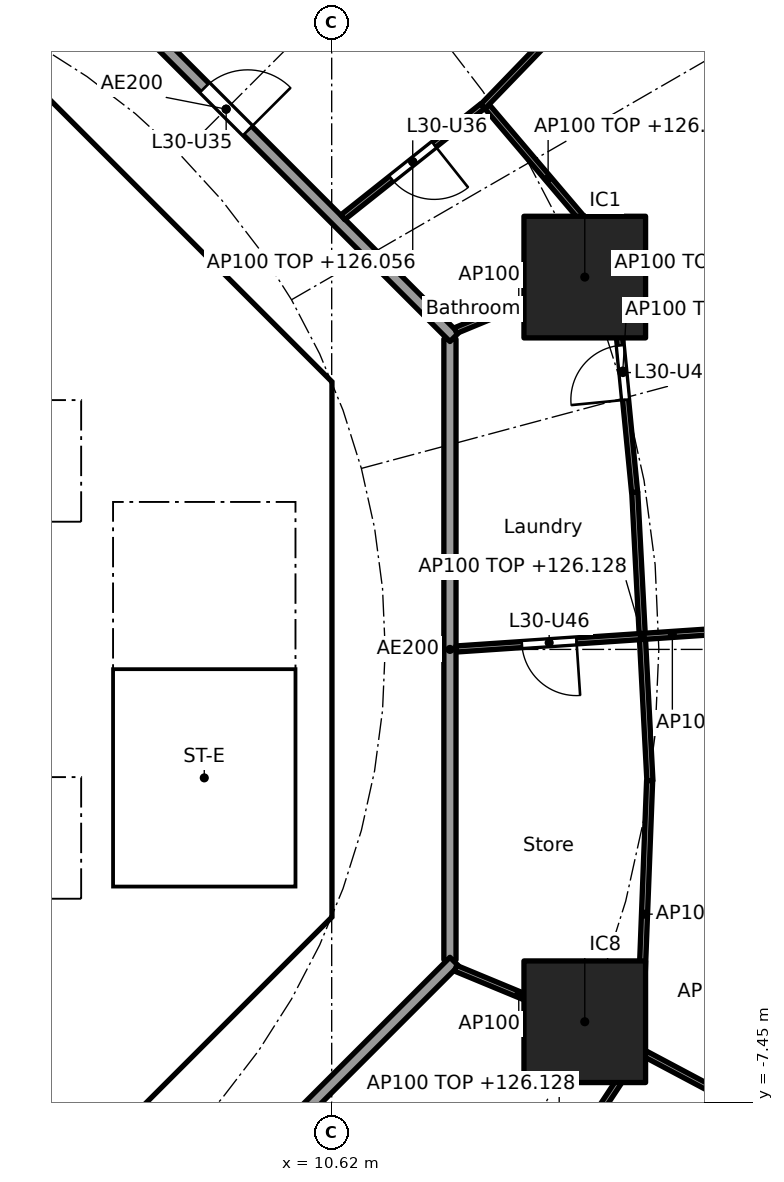
"""IFC4 building model, lengths in metres.
Left out: names, types, materials, properties, quantities, classifications, styles, units other than length and angle.
Written with IfcOpenShell. Run it as: python <this file> out.ifc"""

import sys

from ifc_helpers import new_model, si_unit, direction, frame, frame_2d, origin, origin_2d, place, context, subcontext, project, spatial, polyline, rectangle, outline, extrude, element, fill, save


model = new_model("IFC4")
c1 = context("Model", 3, precision=1e-05, world=origin(), true_north=direction((0.0, 1.0)))
c2 = subcontext(c1, "Body", "Model", "MODEL_VIEW")
j1 = project(units=[si_unit("LENGTHUNIT", "METRE"), si_unit("PLANEANGLEUNIT", "RADIAN")], contexts=[c1])
p1 = place(None, origin())
s1 = spatial("IfcSite", under=j1, at=p1, CompositionType="ELEMENT")
p2 = place(p1, origin())
s2 = spatial("IfcBuilding", under=s1, at=p2, CompositionType="ELEMENT")
p3 = place(p2, frame((0.0, 0.0, 123.3)))
s3 = spatial("IfcBuildingStorey", under=s2, at=p3, CompositionType="ELEMENT", Elevation=123.3)
for number, where, z_axis, x_axis in (
    (1, (14.782, 6.123, 0.0), (0.0, 0.0, 1.0), (1.0, 0.0, 0.0)),
    (2, (14.782, -6.123, 0.0), (0.0, 0.0, 1.0), (1.0, 0.0, 0.0)),
):
    element("IfcColumn", number, at=place(p3, frame(where, z_axis=z_axis, x_axis=x_axis)), inside=s3, PredefinedType="COLUMN", context=c2, shape_type="SweptSolid", body=[
        extrude(rectangle(XDim=2.0, YDim=2.0, at=origin_2d()), origin(), (0.0, 0.0, 1.0), 3.7),
    ])
p4 = place(p3, frame((9.988, 4.613, 0.0), z_axis=(0.0, 0.0, 1.0), x_axis=(-0.707106781187, 0.707106781187, 0.0)))
e3 = element("IfcWall", 3, at=p4, inside=s3, PredefinedType="SHEAR", context=c2, shape_type="SweptSolid", body=[
    extrude(rectangle(XDim=7.602, YDim=0.6, at=frame_2d((3.801, 0.0))), origin(), (0.0, 0.0, 1.0), 3.44),
])
p5 = place(p4, frame((3.201, 0.0, 0.0)))
e4 = element("IfcOpeningElement", 4, at=p5, cuts=e3, PredefinedType="OPENING", context=c2, shape_type="SweptSolid", body=[
    extrude(rectangle(XDim=1.2, YDim=2.1, at=frame_2d((0.6, 1.05))), frame((0.0, 0.31, 0.0), z_axis=(0.0, -1.0, 0.0), x_axis=(1.0, 0.0, 0.0)), (0.0, 0.0, 1.0), 0.62),
])
p6 = place(p3, frame((4.613, -9.988, 0.0), z_axis=(0.0, 0.0, 1.0), x_axis=(0.707106781187, 0.707106781187, 0.0)))
e5 = element("IfcWall", 5, at=p6, inside=s3, PredefinedType="SHEAR", context=c2, shape_type="SweptSolid", body=[
    extrude(rectangle(XDim=7.602, YDim=0.6, at=frame_2d((3.801, 0.0))), origin(), (0.0, 0.0, 1.0), 3.44),
])
p7 = place(p6, frame((3.201, 0.0, 0.0)))
e6 = element("IfcOpeningElement", 6, at=p7, cuts=e5, PredefinedType="OPENING", context=c2, shape_type="SweptSolid", body=[
    extrude(rectangle(XDim=1.2, YDim=2.1, at=frame_2d((0.6, 1.05))), frame((0.0, 0.31, 0.0), z_axis=(0.0, -1.0, 0.0), x_axis=(1.0, 0.0, 0.0)), (0.0, 0.0, 1.0), 0.62),
])
p8 = place(p3, frame((-6.7, 2.0, 0.0), z_axis=(0.0, 0.0, 1.0), x_axis=(1.0, 0.0, 0.0)))
e7 = element("IfcWall", 7, at=p8, inside=s3, PredefinedType="SOLIDWALL", context=c2, shape_type="SweptSolid", body=[
    extrude(rectangle(XDim=13.4, YDim=0.2, at=frame_2d((6.7, 0.0))), origin(), (0.0, 0.0, 1.0), 3.44),
])
p9 = place(p8, frame((0.65, 0.0, 0.0)))
e8 = element("IfcOpeningElement", 8, at=p9, cuts=e7, PredefinedType="OPENING", context=c2, shape_type="SweptSolid", body=[
    extrude(rectangle(XDim=1.1, YDim=2.1, at=frame_2d((0.55, 1.05))), frame((0.0, 0.11, 0.0), z_axis=(0.0, -1.0, 0.0), x_axis=(1.0, 0.0, 0.0)), (0.0, 0.0, 1.0), 0.22),
])
p10 = place(p8, frame((2.85, 0.0, 0.0)))
e9 = element("IfcOpeningElement", 9, at=p10, cuts=e7, PredefinedType="OPENING", context=c2, shape_type="SweptSolid", body=[
    extrude(rectangle(XDim=1.1, YDim=2.1, at=frame_2d((0.55, 1.05))), frame((0.0, 0.11, 0.0), z_axis=(0.0, -1.0, 0.0), x_axis=(1.0, 0.0, 0.0)), (0.0, 0.0, 1.0), 0.22),
])
p11 = place(p8, frame((5.05, 0.0, 0.0)))
e10 = element("IfcOpeningElement", 10, at=p11, cuts=e7, PredefinedType="OPENING", context=c2, shape_type="SweptSolid", body=[
    extrude(rectangle(XDim=1.1, YDim=2.1, at=frame_2d((0.55, 1.05))), frame((0.0, 0.11, 0.0), z_axis=(0.0, -1.0, 0.0), x_axis=(1.0, 0.0, 0.0)), (0.0, 0.0, 1.0), 0.22),
])
p12 = place(p3, frame((6.7, 4.0, 0.0), z_axis=(0.0, 0.0, 1.0), x_axis=(1.0, 0.0, 0.0)))
e11 = element("IfcWall", 11, at=p12, inside=s3, PredefinedType="SOLIDWALL", context=c2, shape_type="SweptSolid", body=[
    extrude(rectangle(XDim=3.325, YDim=0.2, at=frame_2d((1.662, 0.0))), origin(), (0.0, 0.0, 1.0), 3.44),
])
p13 = place(p12, frame((1.25, 0.0, 0.0)))
e12 = element("IfcOpeningElement", 12, at=p13, cuts=e11, PredefinedType="OPENING", context=c2, shape_type="SweptSolid", body=[
    extrude(rectangle(XDim=1.1, YDim=2.1, at=frame_2d((0.55, 1.05))), frame((0.0, 0.11, 0.0), z_axis=(0.0, -1.0, 0.0), x_axis=(1.0, 0.0, 0.0)), (0.0, 0.0, 1.0), 0.22),
])
p14 = place(p3, frame((-6.7, -2.0, 0.0), z_axis=(0.0, 0.0, 1.0), x_axis=(1.0, 0.0, 0.0)))
e13 = element("IfcWall", 13, at=p14, inside=s3, PredefinedType="SOLIDWALL", context=c2, shape_type="SweptSolid", body=[
    extrude(rectangle(XDim=13.4, YDim=0.2, at=frame_2d((6.7, 0.0))), origin(), (0.0, 0.0, 1.0), 3.44),
])
p15 = place(p14, frame((0.65, 0.0, 0.0)))
e14 = element("IfcOpeningElement", 14, at=p15, cuts=e13, PredefinedType="OPENING", context=c2, shape_type="SweptSolid", body=[
    extrude(rectangle(XDim=1.1, YDim=2.1, at=frame_2d((0.55, 1.05))), frame((0.0, 0.11, 0.0), z_axis=(0.0, -1.0, 0.0), x_axis=(1.0, 0.0, 0.0)), (0.0, 0.0, 1.0), 0.22),
])
p16 = place(p14, frame((2.85, 0.0, 0.0)))
e15 = element("IfcOpeningElement", 15, at=p16, cuts=e13, PredefinedType="OPENING", context=c2, shape_type="SweptSolid", body=[
    extrude(rectangle(XDim=1.1, YDim=2.1, at=frame_2d((0.55, 1.05))), frame((0.0, 0.11, 0.0), z_axis=(0.0, -1.0, 0.0), x_axis=(1.0, 0.0, 0.0)), (0.0, 0.0, 1.0), 0.22),
])
p17 = place(p3, origin())
e16 = element("IfcWall", 16, at=p17, inside=s3, PredefinedType="SHEAR", context=c2, shape_type="SweptSolid", body=[
    extrude(outline(polyline([(9.776, -4.401), (10.025, -4.152), (10.025, -3.801), (10.025, 4.152), (9.776, 4.401), (10.2, 4.825), (10.625, 4.401), (10.625, -4.401), (10.2, -4.825), (9.776, -4.401)])), origin(), (0.0, 0.0, 1.0), 3.44),
])
p18 = place(p3, origin())
e17 = element("IfcWall", 17, at=p18, inside=s3, PredefinedType="SOLIDWALL", context=c2, shape_type="SweptSolid", body=[
    extrude(outline(polyline([(-6.7, -2.1), (-6.5, -2.1), (-6.5, -4.1), (-4.5, -4.1), (-4.5, -2.1), (-4.3, -2.1), (-4.3, -4.1), (-2.3, -4.1), (-2.3, -2.1), (-2.1, -2.1), (-2.1, -4.1), (-0.1, -4.1), (-0.1, -2.1), (0.1, -2.1), (0.1, -4.1), (2.1, -4.1), (2.1, -2.1), (2.3, -2.1), (2.3, -4.1), (4.3, -4.1), (4.3, -2.1), (4.5, -2.1), (4.5, -4.1), (6.5, -4.1), (6.5, -2.1), (6.7, -2.1), (6.7, -4.3), (-6.7, -4.3), (-6.7, -2.1)])), origin(), (0.0, 0.0, 1.0), 3.44),
])
p19 = place(p3, origin())
e18 = element("IfcWall", 18, at=p19, inside=s3, PredefinedType="SOLIDWALL", context=c2, shape_type="SweptSolid", body=[
    extrude(outline(polyline([(-6.5, 2.1), (-6.7, 2.1), (-6.7, 4.3), (6.7, 4.3), (6.7, 2.1), (6.5, 2.1), (6.5, 4.1), (4.5, 4.1), (4.5, 2.1), (4.3, 2.1), (4.3, 4.1), (2.3, 4.1), (2.3, 2.1), (2.1, 2.1), (2.1, 4.1), (0.1, 4.1), (0.1, 2.1), (-0.1, 2.1), (-0.1, 4.1), (-2.1, 4.1), (-2.1, 2.1), (-2.3, 2.1), (-2.3, 4.1), (-4.3, 4.1), (-4.3, 2.1), (-4.5, 2.1), (-4.5, 4.1), (-6.5, 4.1), (-6.5, 2.1)])), origin(), (0.0, 0.0, 1.0), 3.44),
])
p20 = place(p3, origin())
e19 = element("IfcWall", 19, at=p20, inside=s3, PredefinedType="SOLIDWALL", context=c2, shape_type="SweptSolid", body=[
    extrude(outline(polyline([(7.025, -3.9), (6.7, -3.9), (6.7, 3.9), (7.025, 3.9), (7.025, -3.9)])), origin(), (0.0, 0.0, 1.0), 3.44),
])
p21 = place(p3, origin())
e20 = element("IfcWall", 20, at=p21, inside=s3, PredefinedType="SOLIDWALL", context=c2, shape_type="SweptSolid", body=[
    extrude(outline(polyline([(10.025, -4.1), (6.7, -4.1), (6.7, -3.9), (10.025, -3.9), (10.025, -4.1)])), origin(), (0.0, 0.0, 1.0), 3.44),
])
p22 = place(p3, frame((12.565, -5.104, 0.0), z_axis=(0.0, 0.0, 1.0), x_axis=(0.0, 1.0, 0.0)))
e21 = element("IfcWall", 21, at=p22, inside=s3, PredefinedType="PARTITIONING", context=c2, shape_type="SweptSolid", body=[
    extrude(rectangle(XDim=10.209, YDim=0.2, at=frame_2d((5.104, 0.0))), origin(), (0.0, 0.0, 1.0), 3.44),
])
p23 = place(p3, frame((12.635, 5.134, 0.0), z_axis=(0.0, 0.0, 1.0), x_axis=(-0.707106781187, 0.707106781187, 0.0)))
e22 = element("IfcWall", 22, at=p23, inside=s3, PredefinedType="PARTITIONING", context=c2, shape_type="SweptSolid", body=[
    extrude(rectangle(XDim=10.609, YDim=0.2, at=frame_2d((5.305, 0.0))), origin(), (0.0, 0.0, 1.0), 3.44),
])
p24 = place(p23, frame((4.804, 0.0, 0.0)))
e23 = element("IfcOpeningElement", 23, at=p24, cuts=e22, PredefinedType="OPENING", context=c2, shape_type="SweptSolid", body=[
    extrude(rectangle(XDim=1.0, YDim=2.1, at=frame_2d((0.5, 1.05))), frame((0.0, 0.11, 0.0), z_axis=(0.0, -1.0, 0.0), x_axis=(1.0, 0.0, 0.0)), (0.0, 0.0, 1.0), 0.22),
])
p25 = place(p3, frame((5.275, -12.494, 0.0), z_axis=(0.0, 0.0, 1.0), x_axis=(0.707106781187, 0.707106781187, 0.0)))
e24 = element("IfcWall", 24, at=p25, inside=s3, PredefinedType="PARTITIONING", context=c2, shape_type="SweptSolid", body=[
    extrude(rectangle(XDim=10.409, YDim=0.2, at=frame_2d((5.205, 0.0))), origin(), (0.0, 0.0, 1.0), 3.44),
])
p26 = place(p3, frame((15.853, -2.158, 0.0), z_axis=(0.0, 0.0, 1.0), x_axis=(-0.052483289253, 0.99862180246, 0.0)))
e25 = element("IfcWall", 25, at=p26, inside=s3, PredefinedType="PARTITIONING", context=c2, shape_type="SweptSolid", body=[
    extrude(rectangle(XDim=4.75, YDim=0.1, at=frame_2d((2.375, 0.0))), origin(), (0.0, 0.0, 1.0), 2.828),
])
p27 = place(p3, frame((15.849, -2.158, 0.0), z_axis=(0.0, 0.0, 1.0), x_axis=(-0.038390448414, -0.999262815014, 0.0)))
e26 = element("IfcWall", 26, at=p27, inside=s3, PredefinedType="PARTITIONING", context=c2, shape_type="SweptSolid", body=[
    extrude(rectangle(XDim=4.394, YDim=0.1, at=frame_2d((2.197, 0.0))), origin(), (0.0, 0.0, 1.0), 3.44),
])
p28 = place(p3, frame((12.665, 0.007, 0.0), z_axis=(0.0, 0.0, 1.0), x_axis=(0.997737186236, 0.067234717233, 0.0)))
e27 = element("IfcWall", 27, at=p28, inside=s3, PredefinedType="PARTITIONING", context=c2, shape_type="SweptSolid", body=[
    extrude(rectangle(XDim=7.132, YDim=0.1, at=frame_2d((3.566, 0.0))), origin(), (0.0, 0.0, 1.0), 2.756),
])
p29 = place(p28, frame((4.651, 0.0, 0.0)))
e28 = element("IfcOpeningElement", 28, at=p29, cuts=e27, PredefinedType="OPENING", context=c2, shape_type="SweptSolid", body=[
    extrude(rectangle(XDim=0.9, YDim=2.1, at=frame_2d((0.45, 1.05))), frame((0.0, 0.06, 0.0), z_axis=(0.0, -1.0, 0.0), x_axis=(1.0, 0.0, 0.0)), (0.0, 0.0, 1.0), 0.12),
])
p30 = place(p28, frame((1.085, 0.0, 0.0)))
e29 = element("IfcOpeningElement", 29, at=p30, cuts=e27, PredefinedType="OPENING", context=c2, shape_type="SweptSolid", body=[
    extrude(rectangle(XDim=0.9, YDim=2.1, at=frame_2d((0.45, 1.05))), frame((0.0, 0.06, 0.0), z_axis=(0.0, -1.0, 0.0), x_axis=(1.0, 0.0, 0.0)), (0.0, 0.0, 1.0), 0.12),
])
p31 = place(p3, frame((15.602, 2.584, 0.0), z_axis=(0.0, 0.0, 1.0), x_axis=(-0.097216297846, 0.995263277446, 0.0)))
e30 = element("IfcWall", 30, at=p31, inside=s3, PredefinedType="PARTITIONING", context=c2, shape_type="SweptSolid", body=[
    extrude(rectangle(XDim=4.006, YDim=0.1, at=frame_2d((2.003, 0.0))), origin(), (0.0, 0.0, 1.0), 2.828),
])
p32 = place(p31, frame((1.528, 0.0, 0.0)))
e31 = element("IfcOpeningElement", 31, at=p32, cuts=e30, PredefinedType="OPENING", context=c2, shape_type="SweptSolid", body=[
    extrude(rectangle(XDim=0.9, YDim=2.1, at=frame_2d((0.45, 1.05))), frame((0.0, 0.06, 0.0), z_axis=(0.0, -1.0, 0.0), x_axis=(1.0, 0.0, 0.0)), (0.0, 0.0, 1.0), 0.12),
])
p33 = place(p3, frame((12.657, 5.243, 0.0), z_axis=(0.0, 0.0, 1.0), x_axis=(0.923864733477, 0.382719158442, 0.0)))
e32 = element("IfcWall", 32, at=p33, inside=s3, PredefinedType="PARTITIONING", context=c2, shape_type="SweptSolid", body=[
    extrude(rectangle(XDim=2.25, YDim=0.1, at=frame_2d((1.125, 0.0))), origin(), (0.0, 0.0, 1.0), 3.44),
])
p34 = place(p3, frame((15.185, 6.559, 0.0), z_axis=(0.0, 0.0, 1.0), x_axis=(-0.647360926376, 0.762183594026, 0.0)))
e33 = element("IfcWall", 33, at=p34, inside=s3, PredefinedType="PARTITIONING", context=c2, shape_type="SweptSolid", body=[
    extrude(rectangle(XDim=3.106, YDim=0.1, at=frame_2d((1.553, 0.0))), origin(), (0.0, 0.0, 1.0), 2.828),
])
p35 = place(p3, frame((18.106, 9.098, 0.0), z_axis=(0.0, 0.0, 1.0), x_axis=(-0.602398572907, 0.798195439325, 0.0)))
e34 = element("IfcWall", 34, at=p35, inside=s3, PredefinedType="PARTITIONING", context=c2, shape_type="SweptSolid", body=[
    extrude(rectangle(XDim=7.044, YDim=0.1, at=frame_2d((3.522, 0.0))), origin(), (0.0, 0.0, 1.0), 2.828),
])
p36 = place(p3, frame((10.803, 7.107, 0.0), z_axis=(0.0, 0.0, 1.0), x_axis=(0.782908385935, 0.622137010017, 0.0)))
e35 = element("IfcWall", 35, at=p36, inside=s3, PredefinedType="PARTITIONING", context=c2, shape_type="SweptSolid", body=[
    extrude(rectangle(XDim=2.937, YDim=0.1, at=frame_2d((1.469, 0.0))), origin(), (0.0, 0.0, 1.0), 2.756),
])
p37 = place(p36, frame((1.019, 0.0, 0.0)))
e36 = element("IfcOpeningElement", 36, at=p37, cuts=e35, PredefinedType="OPENING", context=c2, shape_type="SweptSolid", body=[
    extrude(rectangle(XDim=0.9, YDim=2.1, at=frame_2d((0.45, 1.05))), frame((0.0, 0.06, 0.0), z_axis=(0.0, -1.0, 0.0), x_axis=(1.0, 0.0, 0.0)), (0.0, 0.0, 1.0), 0.12),
])
p38 = place(p3, frame((13.107, 8.929, 0.0), z_axis=(0.0, 0.0, 1.0), x_axis=(0.694592384931, 0.719403515974, 0.0)))
e37 = element("IfcWall", 37, at=p38, inside=s3, PredefinedType="PARTITIONING", context=c2, shape_type="SweptSolid", body=[
    extrude(rectangle(XDim=4.094, YDim=0.1, at=frame_2d((2.047, 0.0))), origin(), (0.0, 0.0, 1.0), 3.44),
])
p39 = place(p38, frame((1.622, 0.0, 0.0)))
e38 = element("IfcOpeningElement", 38, at=p39, cuts=e37, PredefinedType="OPENING", context=c2, shape_type="SweptSolid", body=[
    extrude(rectangle(XDim=0.9, YDim=2.1, at=frame_2d((0.45, 1.05))), frame((0.0, 0.06, 0.0), z_axis=(0.0, -1.0, 0.0), x_axis=(1.0, 0.0, 0.0)), (0.0, 0.0, 1.0), 0.12),
])
p40 = place(p3, frame((13.072, -10.55, 0.0), z_axis=(0.0, 0.0, 1.0), x_axis=(0.550614843759, 0.834759422727, 0.0)))
e39 = element("IfcWall", 39, at=p40, inside=s3, PredefinedType="PARTITIONING", context=c2, shape_type="SweptSolid", body=[
    extrude(rectangle(XDim=4.683, YDim=0.1, at=frame_2d((2.341, 0.0))), origin(), (0.0, 0.0, 1.0), 2.828),
])
p41 = place(p40, frame((1.917, 0.0, 0.0)))
e40 = element("IfcOpeningElement", 40, at=p41, cuts=e39, PredefinedType="OPENING", context=c2, shape_type="SweptSolid", body=[
    extrude(rectangle(XDim=0.9, YDim=2.1, at=frame_2d((0.45, 1.05))), frame((0.0, 0.06, 0.0), z_axis=(0.0, -1.0, 0.0), x_axis=(1.0, 0.0, 0.0)), (0.0, 0.0, 1.0), 0.12),
])
p42 = place(p3, frame((12.657, -5.243, 0.0), z_axis=(0.0, 0.0, 1.0), x_axis=(0.923864733477, -0.382719158442, 0.0)))
e41 = element("IfcWall", 41, at=p42, inside=s3, PredefinedType="PARTITIONING", context=c2, shape_type="SweptSolid", body=[
    extrude(rectangle(XDim=2.25, YDim=0.1, at=frame_2d((1.125, 0.0))), origin(), (0.0, 0.0, 1.0), 3.44),
])
p43 = place(p3, frame((14.826, -6.146, 0.0), z_axis=(0.0, 0.0, 1.0), x_axis=(0.883012998471, -0.469348532044, 0.0)))
e42 = element("IfcWall", 42, at=p43, inside=s3, PredefinedType="PARTITIONING", context=c2, shape_type="SweptSolid", body=[
    extrude(rectangle(XDim=9.172, YDim=0.1, at=frame_2d((4.586, 0.0))), origin(), (0.0, 0.0, 1.0), 2.828),
])
p44 = place(p43, frame((2.728, 0.0, 0.0)))
e43 = element("IfcOpeningElement", 43, at=p44, cuts=e42, PredefinedType="OPENING", context=c2, shape_type="SweptSolid", body=[
    extrude(rectangle(XDim=0.9, YDim=2.1, at=frame_2d((0.45, 1.05))), frame((0.0, 0.06, 0.0), z_axis=(0.0, -1.0, 0.0), x_axis=(1.0, 0.0, 0.0)), (0.0, 0.0, 1.0), 0.12),
])
p45 = place(p13, frame((1.1, 0.0, 0.0), x_axis=(-1.0, 0.0, 0.0)))
e44 = element("IfcDoor", 44, at=p45, inside=s3, OperationType="SINGLE_SWING_LEFT", PredefinedType="DOOR", context=c2, shape_type="SweptSolid", body=[
    extrude(rectangle(XDim=1.1, YDim=2.1, at=frame_2d((0.55, 1.05))), frame((0.0, 0.025, 0.0), z_axis=(0.0, -1.0, 0.0), x_axis=(1.0, 0.0, 0.0)), (0.0, 0.0, 1.0), 0.05),
])
fill(e12, e44)
p46 = place(p5, origin())
e45 = element("IfcDoor", 45, at=p46, inside=s3, OperationType="SINGLE_SWING_RIGHT", PredefinedType="DOOR", context=c2, shape_type="SweptSolid", body=[
    extrude(rectangle(XDim=1.2, YDim=2.1, at=frame_2d((0.6, 1.05))), frame((0.0, 0.025, 0.0), z_axis=(0.0, -1.0, 0.0), x_axis=(1.0, 0.0, 0.0)), (0.0, 0.0, 1.0), 0.05),
])
fill(e4, e45)
p47 = place(p7, origin())
e46 = element("IfcDoor", 46, at=p47, inside=s3, OperationType="SINGLE_SWING_RIGHT", PredefinedType="DOOR", context=c2, shape_type="SweptSolid", body=[
    extrude(rectangle(XDim=1.2, YDim=2.1, at=frame_2d((0.6, 1.05))), frame((0.0, 0.025, 0.0), z_axis=(0.0, -1.0, 0.0), x_axis=(1.0, 0.0, 0.0)), (0.0, 0.0, 1.0), 0.05),
])
fill(e6, e46)
p48 = place(p24, frame((1.0, 0.0, 0.0), x_axis=(-1.0, 0.0, 0.0)))
e47 = element("IfcDoor", 47, at=p48, inside=s3, OperationType="SINGLE_SWING_RIGHT", PredefinedType="DOOR", context=c2, shape_type="SweptSolid", body=[
    extrude(rectangle(XDim=1.0, YDim=2.1, at=frame_2d((0.5, 1.05))), frame((0.0, 0.025, 0.0), z_axis=(0.0, -1.0, 0.0), x_axis=(1.0, 0.0, 0.0)), (0.0, 0.0, 1.0), 0.05),
])
fill(e23, e47)
p49 = place(p37, frame((0.9, 0.0, 0.0), x_axis=(-1.0, 0.0, 0.0)))
e48 = element("IfcDoor", 48, at=p49, inside=s3, OperationType="SINGLE_SWING_LEFT", PredefinedType="DOOR", context=c2, shape_type="SweptSolid", body=[
    extrude(rectangle(XDim=0.9, YDim=2.1, at=frame_2d((0.45, 1.05))), frame((0.0, 0.025, 0.0), z_axis=(0.0, -1.0, 0.0), x_axis=(1.0, 0.0, 0.0)), (0.0, 0.0, 1.0), 0.05),
])
fill(e36, e48)
p50 = place(p32, origin())
e49 = element("IfcDoor", 49, at=p50, inside=s3, OperationType="SINGLE_SWING_LEFT", PredefinedType="DOOR", context=c2, shape_type="SweptSolid", body=[
    extrude(rectangle(XDim=0.9, YDim=2.1, at=frame_2d((0.45, 1.05))), frame((0.0, 0.025, 0.0), z_axis=(0.0, -1.0, 0.0), x_axis=(1.0, 0.0, 0.0)), (0.0, 0.0, 1.0), 0.05),
])
fill(e31, e49)
p51 = place(p30, frame((0.9, 0.0, 0.0), x_axis=(-1.0, 0.0, 0.0)))
e50 = element("IfcDoor", 50, at=p51, inside=s3, OperationType="SINGLE_SWING_LEFT", PredefinedType="DOOR", context=c2, shape_type="SweptSolid", body=[
    extrude(rectangle(XDim=0.9, YDim=2.1, at=frame_2d((0.45, 1.05))), frame((0.0, 0.025, 0.0), z_axis=(0.0, -1.0, 0.0), x_axis=(1.0, 0.0, 0.0)), (0.0, 0.0, 1.0), 0.05),
])
fill(e29, e50)
save(model, sys.argv[1])
